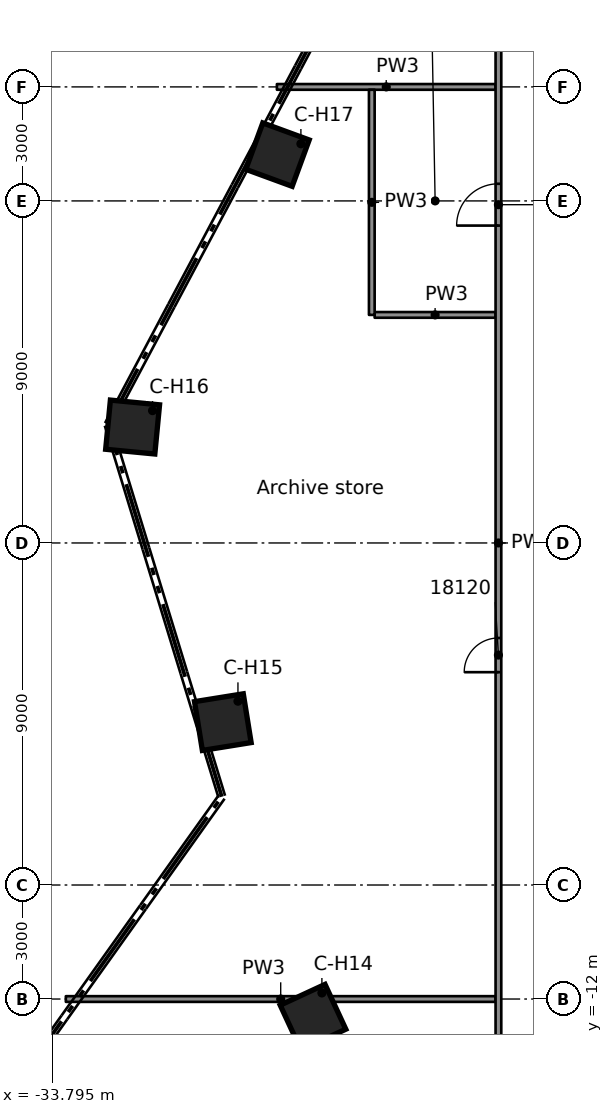
"""IFC4 building model, lengths in metres.
Left out: names, types, materials, properties, quantities, classifications, styles, units other than length and angle.
Written with IfcOpenShell. Run it as: python <this file> out.ifc"""

import sys

from ifc_helpers import new_model, si_unit, direction, frame, frame_2d, origin, origin_2d, place, context, subcontext, project, spatial, rectangle, extrude, element, fill, save


model = new_model("IFC4")
c1 = context("Model", 3, precision=1e-05, world=origin(), true_north=direction((0.0, 1.0)))
c2 = subcontext(c1, "Body", "Model", "MODEL_VIEW")
j1 = project(units=[si_unit("LENGTHUNIT", "METRE"), si_unit("PLANEANGLEUNIT", "RADIAN")], contexts=[c1])
p1 = place(None, origin())
s1 = spatial("IfcSite", under=j1, at=p1, CompositionType="ELEMENT")
p2 = place(p1, origin())
s2 = spatial("IfcBuilding", under=s1, at=p2, CompositionType="ELEMENT")
p3 = place(p2, frame((0.0, 0.0, 91.2)))
s3 = spatial("IfcBuildingStorey", under=s2, at=p3, CompositionType="ELEMENT", Elevation=91.2)
for number, where, z_axis, x_axis in (
    (1, (-26.929, -12.478, 0.0), (0.0, 0.0, 1.0), (-0.907, -0.42, 0.0)),
    (2, (-29.302, -4.714, 0.0), (0.0, 0.0, 1.0), (-0.987, -0.159, 0.0)),
    (3, (-31.676, 3.05, 0.0), (0.0, 0.0, 1.0), (-0.995, 0.096, 0.0)),
    (4, (-27.864, 10.218, 0.0), (0.0, 0.0, 1.0), (-0.939, 0.344, 0.0)),
):
    element("IfcColumn", number, at=place(p3, frame(where, z_axis=z_axis, x_axis=x_axis)), inside=s3, PredefinedType="COLUMN", context=c2, shape_type="SweptSolid", body=[
        extrude(rectangle(XDim=1.3, YDim=1.3, at=origin_2d()), origin(), (0.0, 0.0, 1.0), 3.5),
    ])
p4 = place(p3, frame((-33.433, -12.0, 0.0), z_axis=(0.0, 0.0, 1.0), x_axis=(1.0, 0.0, 0.0)))
e5 = element("IfcWall", 5, at=p4, inside=s3, PredefinedType="PARTITIONING", context=c2, shape_type="SweptSolid", body=[
    extrude(rectangle(XDim=11.308, YDim=0.15, at=frame_2d((5.654, 0.0))), origin(), (0.0, 0.0, 1.0), 3.08),
])
p5 = place(p3, frame((-25.307, 6.001, 0.0), z_axis=(0.0, 0.0, 1.0), x_axis=(1.0, 0.0, 0.0)))
e6 = element("IfcWall", 6, at=p5, inside=s3, PredefinedType="PARTITIONING", context=c2, shape_type="SweptSolid", body=[
    extrude(rectangle(XDim=3.182, YDim=0.15, at=frame_2d((1.591, 0.0))), origin(), (0.0, 0.0, 1.0), 3.08),
])
p6 = place(p3, frame((-27.879, 12.0, 0.0), z_axis=(0.0, 0.0, 1.0), x_axis=(1.0, 0.0, 0.0)))
e7 = element("IfcWall", 7, at=p6, inside=s3, PredefinedType="PARTITIONING", context=c2, shape_type="SweptSolid", body=[
    extrude(rectangle(XDim=5.754, YDim=0.15, at=frame_2d((2.877, 0.0))), origin(), (0.0, 0.0, 1.0), 3.08),
])
p7 = place(p3, frame((-22.05, -15.051, 0.0), z_axis=(0.0, 0.0, 1.0), x_axis=(0.0, 1.0, 0.0)))
e8 = element("IfcWall", 8, at=p7, inside=s3, PredefinedType="PARTITIONING", context=c2, shape_type="SweptSolid", body=[
    extrude(rectangle(XDim=30.102, YDim=0.15, at=frame_2d((15.051, 0.0))), origin(), (0.0, 0.0, 1.0), 3.08),
])
p8 = place(p7, frame((11.651, 0.0, 0.0)))
e9 = element("IfcOpeningElement", 9, at=p8, cuts=e8, PredefinedType="OPENING", context=c2, shape_type="SweptSolid", body=[
    extrude(rectangle(XDim=0.9, YDim=2.1, at=frame_2d((0.45, 1.05))), frame((0.0, 0.085, 0.0), z_axis=(0.0, -1.0, 0.0), x_axis=(1.0, 0.0, 0.0)), (0.0, 0.0, 1.0), 0.17),
])
p9 = place(p7, frame((1.1, 0.0, 0.0)))
e10 = element("IfcOpeningElement", 10, at=p9, cuts=e8, PredefinedType="OPENING", context=c2, shape_type="SweptSolid", body=[
    extrude(rectangle(XDim=0.9, YDim=2.1, at=frame_2d((0.45, 1.05))), frame((0.0, 0.085, 0.0), z_axis=(0.0, -1.0, 0.0), x_axis=(1.0, 0.0, 0.0)), (0.0, 0.0, 1.0), 0.17),
])
p10 = place(p7, frame((23.402, 0.0, 0.0)))
e11 = element("IfcOpeningElement", 11, at=p10, cuts=e8, PredefinedType="OPENING", context=c2, shape_type="SweptSolid", body=[
    extrude(rectangle(XDim=1.1, YDim=2.1, at=frame_2d((0.55, 1.05))), frame((0.0, 0.085, 0.0), z_axis=(0.0, -1.0, 0.0), x_axis=(1.0, 0.0, 0.0)), (0.0, 0.0, 1.0), 0.17),
])
p11 = place(p3, frame((-25.382, 6.001, 0.0), z_axis=(0.0, 0.0, 1.0), x_axis=(0.0, 1.0, 0.0)))
e12 = element("IfcWall", 12, at=p11, inside=s3, PredefinedType="PARTITIONING", context=c2, shape_type="SweptSolid", body=[
    extrude(rectangle(XDim=5.924, YDim=0.15, at=frame_2d((2.962, 0.0))), origin(), (0.0, 0.0, 1.0), 3.08),
])
p12 = place(p8, origin())
e13 = element("IfcDoor", 13, at=p12, inside=s3, OperationType="SINGLE_SWING_LEFT", PredefinedType="DOOR", context=c2, shape_type="SweptSolid", body=[
    extrude(rectangle(XDim=0.9, YDim=2.1, at=frame_2d((0.45, 1.05))), frame((0.0, 0.025, 0.0), z_axis=(0.0, -1.0, 0.0), x_axis=(1.0, 0.0, 0.0)), (0.0, 0.0, 1.0), 0.05),
])
fill(e9, e13)
p13 = place(p10, origin())
e14 = element("IfcDoor", 14, at=p13, inside=s3, OperationType="SINGLE_SWING_RIGHT", PredefinedType="DOOR", context=c2, shape_type="SweptSolid", body=[
    extrude(rectangle(XDim=1.1, YDim=2.1, at=frame_2d((0.55, 1.05))), frame((0.0, 0.025, 0.0), z_axis=(0.0, -1.0, 0.0), x_axis=(1.0, 0.0, 0.0)), (0.0, 0.0, 1.0), 0.05),
])
fill(e11, e14)
save(model, sys.argv[1])
